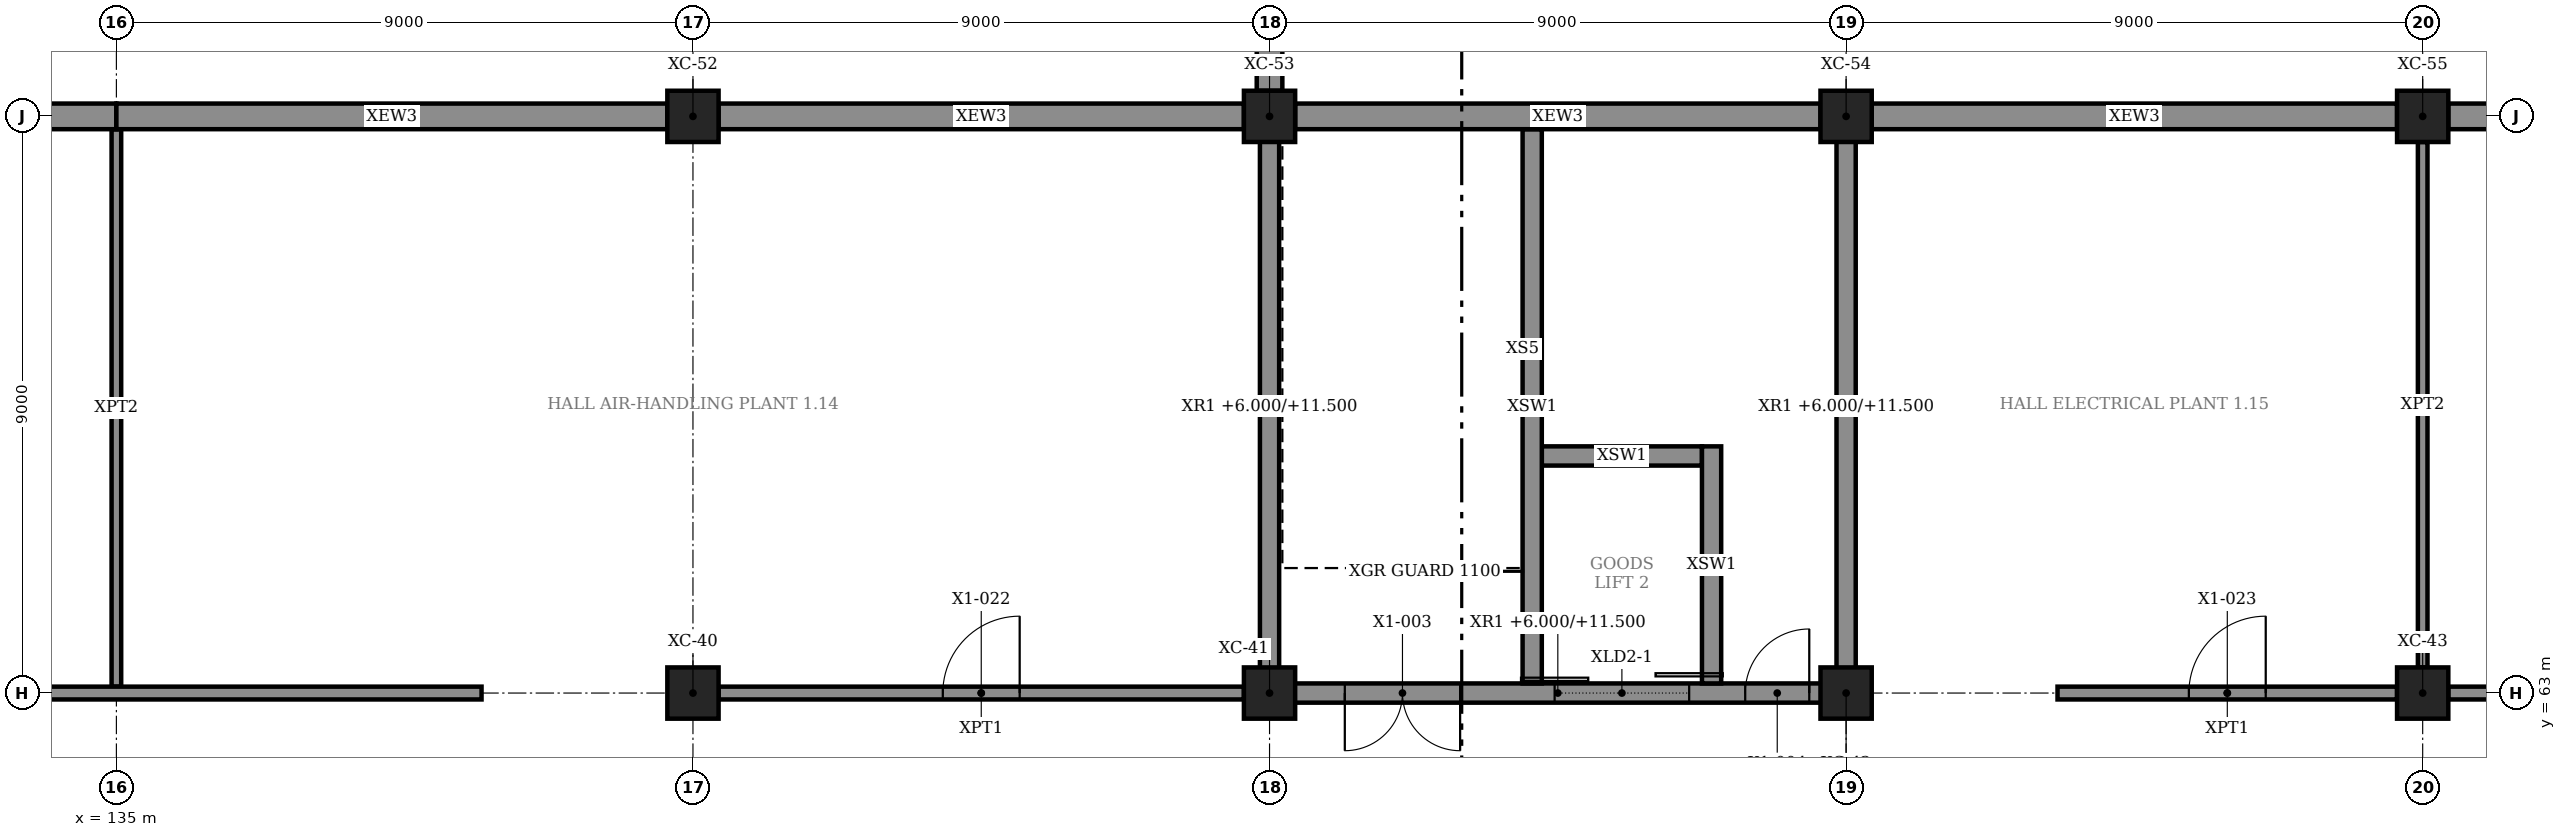
"""IFC4 building model, lengths in metres.
Left out: names, types, materials, properties, quantities, classifications, styles, units other than length and angle.
Written with IfcOpenShell. Run it as: python <this file> out.ifc"""

import sys

from ifc_helpers import new_model, si_unit, direction, frame, frame_2d, origin, origin_2d, place, context, subcontext, project, spatial, rectangle, extrude, element, fill, save


model = new_model("IFC4")
c1 = context("Model", 3, precision=1e-05, world=origin(), true_north=direction((0.0, 1.0)))
c2 = subcontext(c1, "Body", "Model", "MODEL_VIEW")
j1 = project(units=[si_unit("LENGTHUNIT", "METRE"), si_unit("PLANEANGLEUNIT", "RADIAN")], contexts=[c1])
p1 = place(None, origin())
s1 = spatial("IfcSite", under=j1, at=p1, CompositionType="ELEMENT")
p2 = place(p1, origin())
s2 = spatial("IfcBuilding", under=s1, at=p2, CompositionType="ELEMENT")
p3 = place(p2, frame((0.0, 0.0, 6.0)))
s3 = spatial("IfcBuildingStorey", under=s2, at=p3, CompositionType="ELEMENT", Elevation=6.0)
for number, where, z_axis, x_axis in (
    (1, (144.0, 63.0, 0.0), (0.0, 0.0, 1.0), (1.0, 0.0, 0.0)),
    (2, (153.0, 63.0, 0.0), (0.0, 0.0, 1.0), (1.0, 0.0, 0.0)),
    (3, (162.0, 63.0, 0.0), (0.0, 0.0, 1.0), (1.0, 0.0, 0.0)),
    (4, (171.0, 63.0, 0.0), (0.0, 0.0, 1.0), (1.0, 0.0, 0.0)),
    (5, (144.0, 72.0, 0.0), (0.0, 0.0, 1.0), (1.0, 0.0, 0.0)),
    (6, (153.0, 72.0, 0.0), (0.0, 0.0, 1.0), (1.0, 0.0, 0.0)),
    (7, (162.0, 72.0, 0.0), (0.0, 0.0, 1.0), (1.0, 0.0, 0.0)),
    (8, (171.0, 72.0, 0.0), (0.0, 0.0, 1.0), (1.0, 0.0, 0.0)),
):
    element("IfcColumn", number, at=place(p3, frame(where, z_axis=z_axis, x_axis=x_axis)), inside=s3, PredefinedType="COLUMN", context=c2, shape_type="SweptSolid", body=[
        extrude(rectangle(XDim=0.8, YDim=0.8, at=origin_2d()), origin(), (0.0, 0.0, 1.0), 5.5),
    ])
p4 = place(p3, frame((152.85, 63.0, 0.0), z_axis=(0.0, 0.0, 1.0), x_axis=(1.0, 0.0, 0.0)))
e9 = element("IfcWall", 9, at=p4, inside=s3, PredefinedType="SHEAR", context=c2, shape_type="SweptSolid", body=[
    extrude(rectangle(XDim=9.3, YDim=0.3, at=frame_2d((4.65, 0.0))), origin(), (0.0, 0.0, 1.0), 5.5),
])
p5 = place(p4, frame((1.325, 0.0, 0.0)))
e10 = element("IfcOpeningElement", 10, at=p5, cuts=e9, PredefinedType="OPENING", context=c2, shape_type="SweptSolid", body=[
    extrude(rectangle(XDim=1.8, YDim=2.4, at=frame_2d((0.9, 1.2))), frame((0.0, 0.16, 0.0), z_axis=(0.0, -1.0, 0.0), x_axis=(1.0, 0.0, 0.0)), (0.0, 0.0, 1.0), 0.32),
])
p6 = place(p4, frame((4.6, 0.0, 0.0)))
e11 = element("IfcOpeningElement", 11, at=p6, cuts=e9, PredefinedType="OPENING", context=c2, shape_type="SweptSolid", body=[
    extrude(rectangle(XDim=2.1, YDim=2.4, at=frame_2d((1.05, 1.2))), frame((0.0, 0.16, 0.0), z_axis=(0.0, -1.0, 0.0), x_axis=(1.0, 0.0, 0.0)), (0.0, 0.0, 1.0), 0.32),
])
p7 = place(p4, frame((7.575, 0.0, 0.0)))
e12 = element("IfcOpeningElement", 12, at=p7, cuts=e9, PredefinedType="OPENING", context=c2, shape_type="SweptSolid", body=[
    extrude(rectangle(XDim=1.0, YDim=2.4, at=frame_2d((0.5, 1.2))), frame((0.0, 0.16, 0.0), z_axis=(0.0, -1.0, 0.0), x_axis=(1.0, 0.0, 0.0)), (0.0, 0.0, 1.0), 0.32),
])
for number, where, z_axis, x_axis in (
    (13, (153.0, 63.15, 0.0), (0.0, 0.0, 1.0), (0.0, 1.0, 0.0)),
    (14, (162.0, 63.15, 0.0), (0.0, 0.0, 1.0), (0.0, 1.0, 0.0)),
):
    element("IfcWall", number, at=place(p3, frame(where, z_axis=z_axis, x_axis=x_axis)), inside=s3, PredefinedType="SHEAR", context=c2, shape_type="SweptSolid", body=[
        extrude(rectangle(XDim=8.65, YDim=0.3, at=frame_2d((4.325, 0.0))), origin(), (0.0, 0.0, 1.0), 5.5),
    ])
p8 = place(p3, frame((126.0, 72.0, -0.28), z_axis=(0.0, 0.0, 1.0), x_axis=(1.0, 0.0, 0.0)))
e15 = element("IfcWall", 15, at=p8, inside=s3, PredefinedType="SOLIDWALL", context=c2, shape_type="SweptSolid", body=[
    extrude(rectangle(XDim=9.0, YDim=0.4, at=frame_2d((4.5, 0.0))), origin(), (0.0, 0.0, 1.0), 5.78),
])
p9 = place(p3, frame((135.0, 72.0, -0.28), z_axis=(0.0, 0.0, 1.0), x_axis=(1.0, 0.0, 0.0)))
e16 = element("IfcWall", 16, at=p9, inside=s3, PredefinedType="SOLIDWALL", context=c2, shape_type="SweptSolid", body=[
    extrude(rectangle(XDim=8.6, YDim=0.4, at=frame_2d((4.3, 0.0))), origin(), (0.0, 0.0, 1.0), 5.78),
])
for number, where, z_axis, x_axis in (
    (17, (144.4, 72.0, -0.28), (0.0, 0.0, 1.0), (1.0, 0.0, 0.0)),
    (18, (153.4, 72.0, -0.28), (0.0, 0.0, 1.0), (1.0, 0.0, 0.0)),
    (19, (162.4, 72.0, -0.28), (0.0, 0.0, 1.0), (1.0, 0.0, 0.0)),
):
    element("IfcWall", number, at=place(p3, frame(where, z_axis=z_axis, x_axis=x_axis)), inside=s3, PredefinedType="SOLIDWALL", context=c2, shape_type="SweptSolid", body=[
        extrude(rectangle(XDim=8.2, YDim=0.4, at=frame_2d((4.1, 0.0))), origin(), (0.0, 0.0, 1.0), 5.78),
    ])
p10 = place(p3, frame((171.4, 72.0, -0.28), z_axis=(0.0, 0.0, 1.0), x_axis=(1.0, 0.0, 0.0)))
e20 = element("IfcWall", 20, at=p10, inside=s3, PredefinedType="SOLIDWALL", context=c2, shape_type="SweptSolid", body=[
    extrude(rectangle(XDim=8.6, YDim=0.4, at=frame_2d((4.3, 0.0))), origin(), (0.0, 0.0, 1.0), 5.78),
])
p11 = place(p3, frame((153.0, 72.4, 0.0), z_axis=(0.0, 0.0, 1.0), x_axis=(0.0, 1.0, 0.0)))
e21 = element("IfcWall", 21, at=p11, inside=s3, PredefinedType="SOLIDWALL", context=c2, shape_type="SweptSolid", body=[
    extrude(rectangle(XDim=8.2, YDim=0.4, at=frame_2d((4.1, 0.0))), origin(), (0.0, 0.0, 1.0), 5.5),
])
p12 = place(p3, frame((157.1, 63.15, 0.0), z_axis=(0.0, 0.0, 1.0), x_axis=(0.0, 1.0, 0.0)))
e22 = element("IfcWall", 22, at=p12, inside=s3, PredefinedType="SHEAR", context=c2, shape_type="SweptSolid", body=[
    extrude(rectangle(XDim=8.65, YDim=0.3, at=frame_2d((4.325, 0.0))), origin(), (0.0, 0.0, 1.0), 5.25),
])
p13 = place(p3, frame((159.9, 63.15, 0.0), z_axis=(0.0, 0.0, 1.0), x_axis=(0.0, 1.0, 0.0)))
e23 = element("IfcWall", 23, at=p13, inside=s3, PredefinedType="SHEAR", context=c2, shape_type="SweptSolid", body=[
    extrude(rectangle(XDim=3.7, YDim=0.3, at=frame_2d((1.85, 0.0))), origin(), (0.0, 0.0, 1.0), 5.25),
])
p14 = place(p3, frame((157.25, 66.7, 0.0), z_axis=(0.0, 0.0, 1.0), x_axis=(1.0, 0.0, 0.0)))
e24 = element("IfcWall", 24, at=p14, inside=s3, PredefinedType="SHEAR", context=c2, shape_type="SweptSolid", body=[
    extrude(rectangle(XDim=2.5, YDim=0.3, at=frame_2d((1.25, 0.0))), origin(), (0.0, 0.0, 1.0), 5.25),
])
p15 = place(p3, frame((117.4, 63.0, 0.0), z_axis=(0.0, 0.0, 1.0), x_axis=(1.0, 0.0, 0.0)))
e25 = element("IfcWall", 25, at=p15, inside=s3, PredefinedType="PARTITIONING", context=c2, shape_type="SweptSolid", body=[
    extrude(rectangle(XDim=23.3, YDim=0.2, at=frame_2d((11.65, 0.0))), origin(), (0.0, 0.0, 1.0), 5.25),
])
p16 = place(p15, frame((3.55, 0.0, 0.015)))
e26 = element("IfcOpeningElement", 26, at=p16, cuts=e25, PredefinedType="OPENING", context=c2, shape_type="SweptSolid", body=[
    extrude(rectangle(XDim=1.1, YDim=2.4, at=frame_2d((0.55, 1.2))), frame((0.0, 0.11, 0.0), z_axis=(0.0, -1.0, 0.0), x_axis=(1.0, 0.0, 0.0)), (0.0, 0.0, 1.0), 0.22),
])
p17 = place(p15, frame((6.6, 0.0, 0.015)))
e27 = element("IfcOpeningElement", 27, at=p17, cuts=e25, PredefinedType="OPENING", context=c2, shape_type="SweptSolid", body=[
    extrude(rectangle(XDim=1.0, YDim=2.4, at=frame_2d((0.5, 1.2))), frame((0.0, 0.11, 0.0), z_axis=(0.0, -1.0, 0.0), x_axis=(1.0, 0.0, 0.0)), (0.0, 0.0, 1.0), 0.22),
])
p18 = place(p15, frame((12.6, 0.0, 0.015)))
e28 = element("IfcOpeningElement", 28, at=p18, cuts=e25, PredefinedType="OPENING", context=c2, shape_type="SweptSolid", body=[
    extrude(rectangle(XDim=1.0, YDim=2.4, at=frame_2d((0.5, 1.2))), frame((0.0, 0.11, 0.0), z_axis=(0.0, -1.0, 0.0), x_axis=(1.0, 0.0, 0.0)), (0.0, 0.0, 1.0), 0.22),
])
p19 = place(p3, frame((144.4, 63.0, 0.0), z_axis=(0.0, 0.0, 1.0), x_axis=(1.0, 0.0, 0.0)))
e29 = element("IfcWall", 29, at=p19, inside=s3, PredefinedType="PARTITIONING", context=c2, shape_type="SweptSolid", body=[
    extrude(rectangle(XDim=8.2, YDim=0.2, at=frame_2d((4.1, 0.0))), origin(), (0.0, 0.0, 1.0), 5.25),
])
p20 = place(p19, frame((3.5, 0.0, 0.015)))
e30 = element("IfcOpeningElement", 30, at=p20, cuts=e29, PredefinedType="OPENING", context=c2, shape_type="SweptSolid", body=[
    extrude(rectangle(XDim=1.2, YDim=2.4, at=frame_2d((0.6, 1.2))), frame((0.0, 0.11, 0.0), z_axis=(0.0, -1.0, 0.0), x_axis=(1.0, 0.0, 0.0)), (0.0, 0.0, 1.0), 0.22),
])
p21 = place(p3, frame((165.3, 63.0, 0.0), z_axis=(0.0, 0.0, 1.0), x_axis=(1.0, 0.0, 0.0)))
e31 = element("IfcWall", 31, at=p21, inside=s3, PredefinedType="PARTITIONING", context=c2, shape_type="SweptSolid", body=[
    extrude(rectangle(XDim=5.3, YDim=0.2, at=frame_2d((2.65, 0.0))), origin(), (0.0, 0.0, 1.0), 5.25),
])
p22 = place(p21, frame((2.05, 0.0, 0.015)))
e32 = element("IfcOpeningElement", 32, at=p22, cuts=e31, PredefinedType="OPENING", context=c2, shape_type="SweptSolid", body=[
    extrude(rectangle(XDim=1.2, YDim=2.4, at=frame_2d((0.6, 1.2))), frame((0.0, 0.11, 0.0), z_axis=(0.0, -1.0, 0.0), x_axis=(1.0, 0.0, 0.0)), (0.0, 0.0, 1.0), 0.22),
])
p23 = place(p3, frame((171.4, 63.0, 0.0), z_axis=(0.0, 0.0, 1.0), x_axis=(1.0, 0.0, 0.0)))
e33 = element("IfcWall", 33, at=p23, inside=s3, PredefinedType="PARTITIONING", context=c2, shape_type="SweptSolid", body=[
    extrude(rectangle(XDim=5.8, YDim=0.2, at=frame_2d((2.9, 0.0))), origin(), (0.0, 0.0, 1.0), 5.25),
])
p24 = place(p3, frame((135.0, 63.1, 0.0), z_axis=(0.0, 0.0, 1.0), x_axis=(0.0, 1.0, 0.0)))
e34 = element("IfcWall", 34, at=p24, inside=s3, PredefinedType="PARTITIONING", context=c2, shape_type="SweptSolid", body=[
    extrude(rectangle(XDim=8.7, YDim=0.15, at=frame_2d((4.35, 0.0))), origin(), (0.0, 0.0, 1.0), 5.25),
])
p25 = place(p3, frame((171.0, 63.4, 0.0), z_axis=(0.0, 0.0, 1.0), x_axis=(0.0, 1.0, 0.0)))
e35 = element("IfcWall", 35, at=p25, inside=s3, PredefinedType="PARTITIONING", context=c2, shape_type="SweptSolid", body=[
    extrude(rectangle(XDim=8.2, YDim=0.15, at=frame_2d((4.1, 0.0))), origin(), (0.0, 0.0, 1.0), 5.25),
])
p26 = place(p5, frame((1.8, 0.0, 0.0), z_axis=(0.0, 0.0, 1.0), x_axis=(-1.0, 0.0, 0.0)))
e36 = element("IfcDoor", 36, at=p26, inside=s3, OperationType="DOUBLE_DOOR_SINGLE_SWING", PredefinedType="DOOR", context=c2, shape_type="SweptSolid", body=[
    extrude(rectangle(XDim=1.8, YDim=2.4, at=frame_2d((0.9, 1.2))), frame((0.0, 0.025, 0.0), z_axis=(0.0, -1.0, 0.0), x_axis=(1.0, 0.0, 0.0)), (0.0, 0.0, 1.0), 0.05),
])
fill(e10, e36)
p27 = place(p6, origin())
e37 = element("IfcDoor", 37, at=p27, inside=s3, OperationType="DOUBLE_DOOR_SLIDING", PredefinedType="DOOR", context=c2, shape_type="SweptSolid", body=[
    extrude(rectangle(XDim=2.1, YDim=2.4, at=frame_2d((1.05, 1.2))), frame((0.0, 0.025, 0.0), z_axis=(0.0, -1.0, 0.0), x_axis=(1.0, 0.0, 0.0)), (0.0, 0.0, 1.0), 0.05),
])
fill(e11, e37)
p28 = place(p7, origin())
e38 = element("IfcDoor", 38, at=p28, inside=s3, OperationType="SINGLE_SWING_RIGHT", PredefinedType="DOOR", context=c2, shape_type="SweptSolid", body=[
    extrude(rectangle(XDim=1.0, YDim=2.4, at=frame_2d((0.5, 1.2))), frame((0.0, 0.025, 0.0), z_axis=(0.0, -1.0, 0.0), x_axis=(1.0, 0.0, 0.0)), (0.0, 0.0, 1.0), 0.05),
])
fill(e12, e38)
p29 = place(p20, origin())
e39 = element("IfcDoor", 39, at=p29, inside=s3, OperationType="SINGLE_SWING_RIGHT", PredefinedType="DOOR", context=c2, shape_type="SweptSolid", body=[
    extrude(rectangle(XDim=1.2, YDim=2.4, at=frame_2d((0.6, 1.2))), frame((0.0, 0.025, 0.0), z_axis=(0.0, -1.0, 0.0), x_axis=(1.0, 0.0, 0.0)), (0.0, 0.0, 1.0), 0.05),
])
fill(e30, e39)
p30 = place(p22, origin())
e40 = element("IfcDoor", 40, at=p30, inside=s3, OperationType="SINGLE_SWING_RIGHT", PredefinedType="DOOR", context=c2, shape_type="SweptSolid", body=[
    extrude(rectangle(XDim=1.2, YDim=2.4, at=frame_2d((0.6, 1.2))), frame((0.0, 0.025, 0.0), z_axis=(0.0, -1.0, 0.0), x_axis=(1.0, 0.0, 0.0)), (0.0, 0.0, 1.0), 0.05),
])
fill(e32, e40)
save(model, sys.argv[1])
